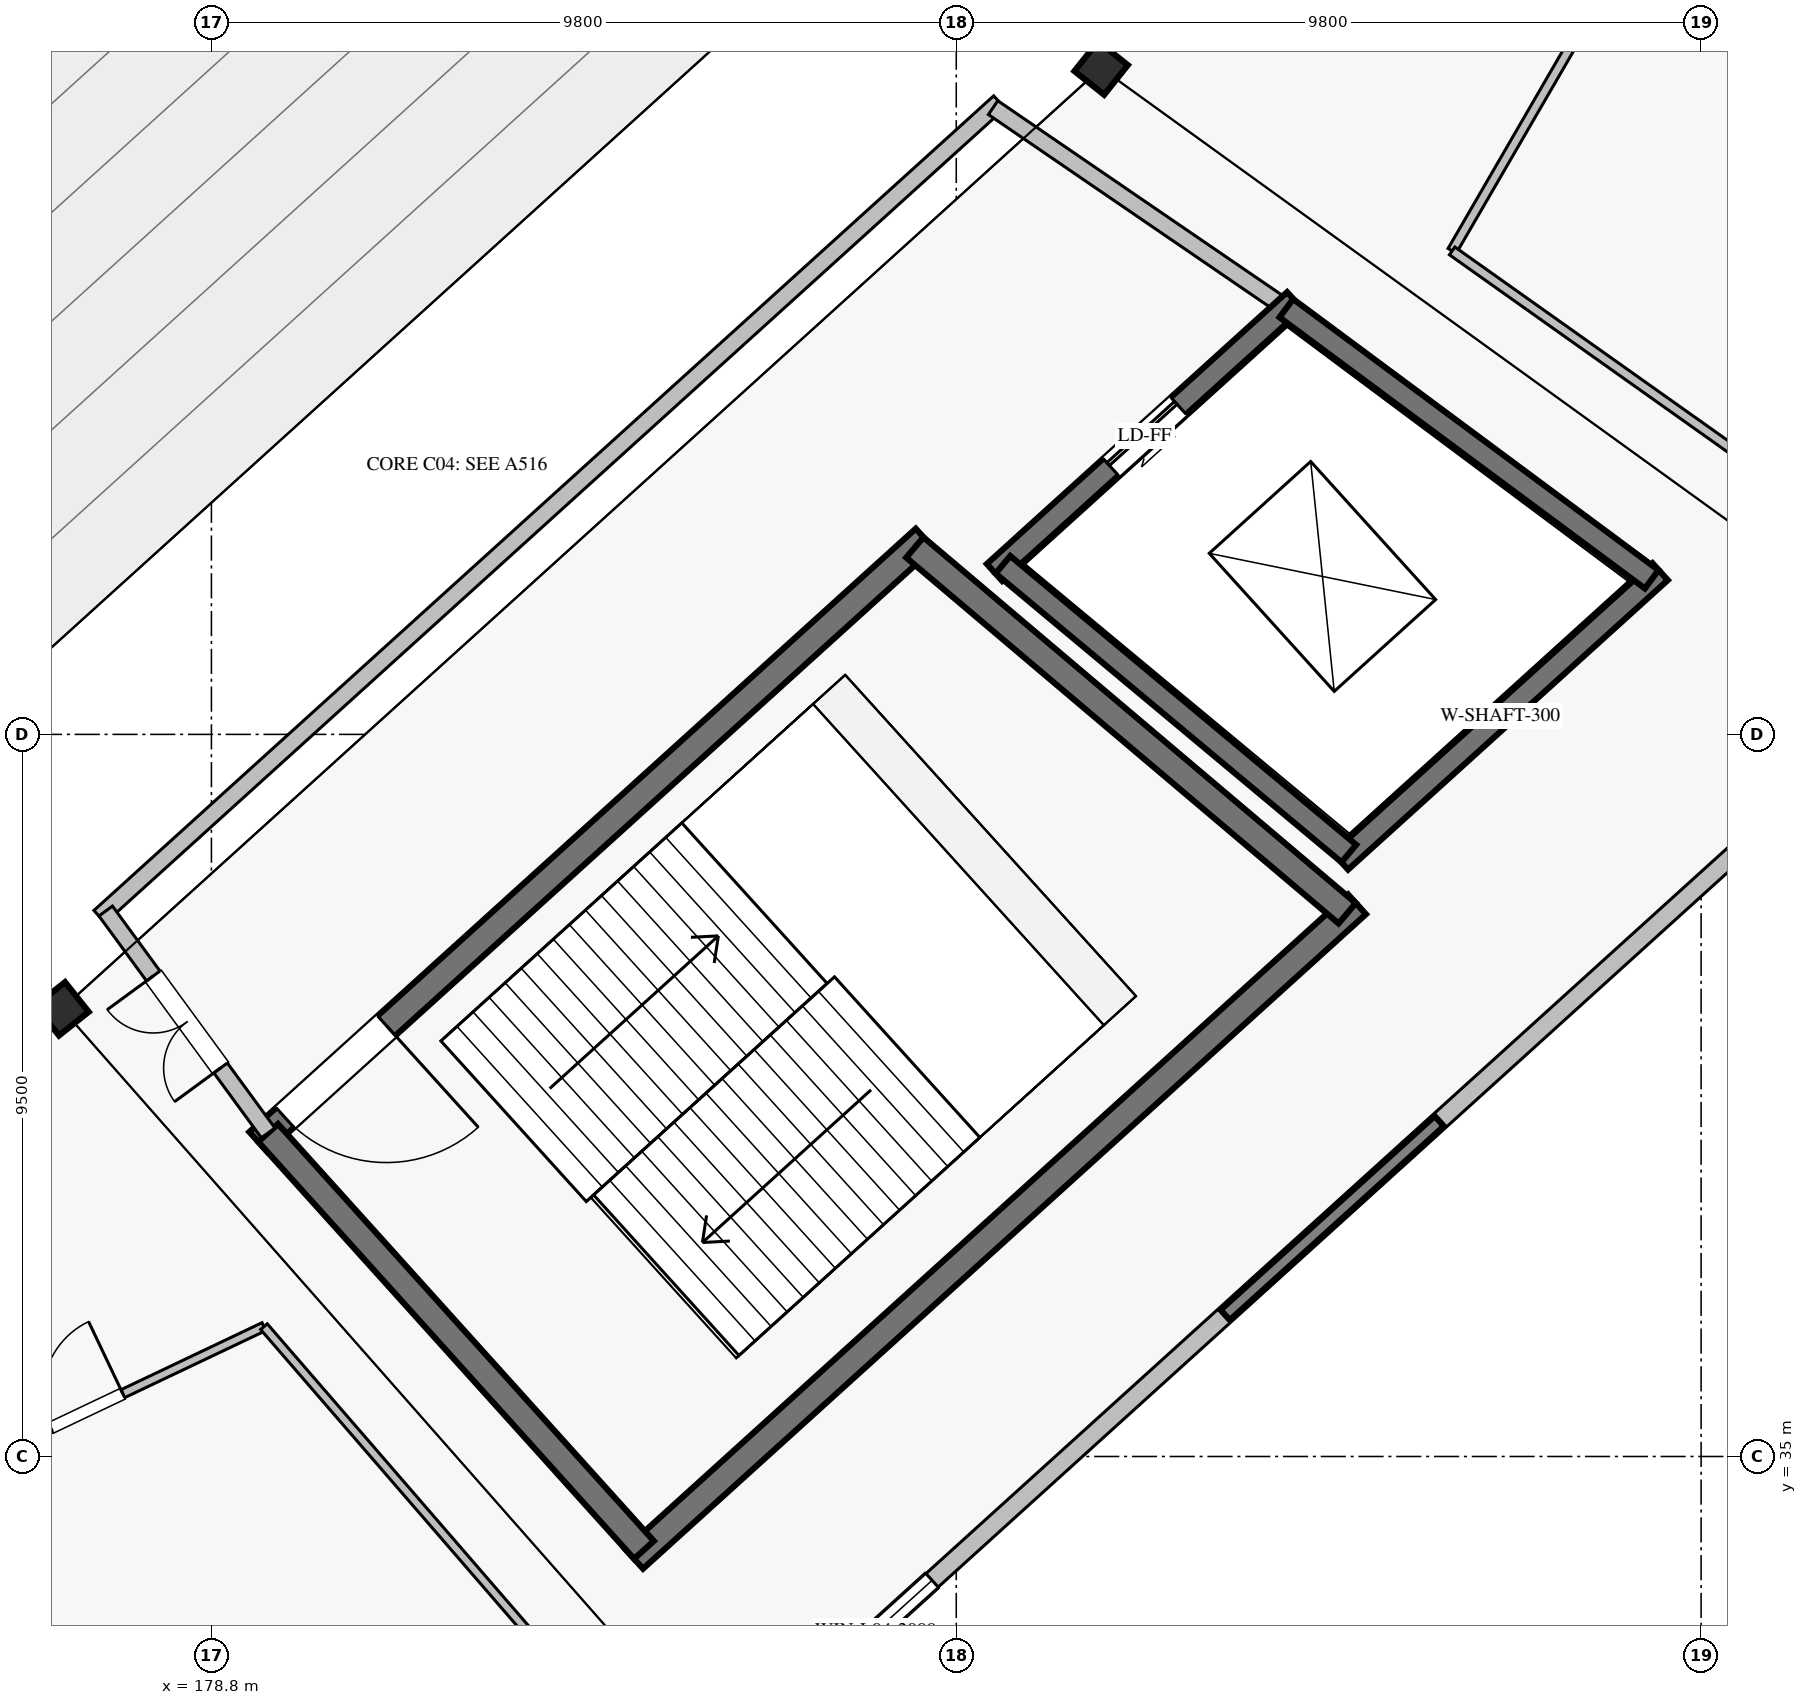
"""IFC4 building model, lengths in metres.
Left out: names, types, materials, properties, quantities, classifications, styles, units other than length and angle.
Written with IfcOpenShell. Run it as: python <this file> out.ifc"""

import sys

from ifc_helpers import new_model, si_unit, direction, frame, frame_2d, origin, origin_2d, place, context, subcontext, project, spatial, rectangle, hollow_rectangle, extrude, element, fill, save


model = new_model("IFC4")
c1 = context("Model", 3, precision=1e-05, world=origin(), true_north=direction((0.0, 1.0)))
c2 = subcontext(c1, "Body", "Model", "MODEL_VIEW")
j1 = project(units=[si_unit("LENGTHUNIT", "METRE"), si_unit("PLANEANGLEUNIT", "RADIAN")], contexts=[c1])
p1 = place(None, origin())
s1 = spatial("IfcSite", under=j1, at=p1, CompositionType="ELEMENT")
p2 = place(p1, origin())
s2 = spatial("IfcBuilding", under=s1, at=p2, CompositionType="ELEMENT")
p3 = place(p2, frame((0.0, 0.0, 20.4)))
s3 = spatial("IfcBuildingStorey", under=s2, at=p3, CompositionType="ELEMENT", Elevation=20.4)
for number, where, z_axis, x_axis in (
    (1, (176.834, 40.889, 0.0), (0.0, 0.0, 1.0), (0.623, -0.782, 0.0)),
    (2, (190.506, 53.266, 0.0), (0.0, 0.0, 1.0), (0.782, -0.623, 0.0)),
):
    element("IfcColumn", number, at=place(p3, frame(where, z_axis=z_axis, x_axis=x_axis)), inside=s3, PredefinedType="COLUMN", context=c2, shape_type="SweptSolid", body=[
        extrude(hollow_rectangle(XDim=0.5, YDim=0.5, WallThickness=0.022, at=origin_2d()), origin(), (0.0, 0.0, 1.0), 5.44),
    ])
p4 = place(p3, frame((185.761, 31.089, 0.0), z_axis=(0.0, 0.0, 1.0), x_axis=(0.741349049196, 0.671119651967, 0.0)))
e3 = element("IfcWall", 3, at=p4, inside=s3, PredefinedType="SOLIDWALL", context=c2, shape_type="SweptSolid", body=[
    extrude(rectangle(XDim=21.004, YDim=0.24, at=frame_2d((10.502, 0.0))), origin(), (0.0, 0.0, 1.0), 4.53),
])
p5 = place(p4, frame((1.4, 0.0, 1.0)))
e4 = element("IfcOpeningElement", 4, at=p5, cuts=e3, PredefinedType="OPENING", context=c2, shape_type="SweptSolid", body=[
    extrude(rectangle(XDim=2.0, YDim=1.55, at=frame_2d((1.0, 0.775))), frame((0.0, 0.13, 0.0), z_axis=(0.0, -1.0, 0.0), x_axis=(1.0, 0.0, 0.0)), (0.0, 0.0, 1.0), 0.26),
])
p6 = place(p3, frame((179.417, 39.14, 0.0), z_axis=(0.0, 0.0, 1.0), x_axis=(0.741348929385, 0.671119784315, 0.0)))
e5 = element("IfcWall", 5, at=p6, inside=s3, PredefinedType="SHEAR", context=c2, shape_type="SweptSolid", body=[
    extrude(rectangle(XDim=11.826, YDim=0.35, at=frame_2d((5.913, 0.0))), origin(), (0.0, 0.0, 1.0), 5.18),
])
p7 = place(p6, frame((0.475, 0.0, 0.0)))
e6 = element("IfcOpeningElement", 6, at=p7, cuts=e5, PredefinedType="OPENING", context=c2, shape_type="SweptSolid", body=[
    extrude(rectangle(XDim=1.8, YDim=2.2, at=frame_2d((0.9, 1.1))), frame((0.0, 0.185, 0.0), z_axis=(0.0, -1.0, 0.0), x_axis=(1.0, 0.0, 0.0)), (0.0, 0.0, 1.0), 0.37),
])
p8 = place(p3, frame((184.361, 33.653, 0.0), z_axis=(0.0, 0.0, 1.0), x_axis=(0.741351373721, 0.671117084183, 0.0)))
e7 = element("IfcWall", 7, at=p8, inside=s3, PredefinedType="SHEAR", context=c2, shape_type="SweptSolid", body=[
    extrude(rectangle(XDim=12.83, YDim=0.35, at=frame_2d((6.415, 0.0))), origin(), (0.0, 0.0, 1.0), 5.18),
])
p9 = place(p3, frame((179.546, 39.257, 0.0), z_axis=(0.0, 0.0, 1.0), x_axis=(0.669463145673, -0.742845270958, 0.0)))
e8 = element("IfcWall", 8, at=p9, inside=s3, PredefinedType="SHEAR", context=c2, shape_type="SweptSolid", body=[
    extrude(rectangle(XDim=7.386, YDim=0.35, at=frame_2d((3.693, 0.0))), origin(), (0.0, 0.0, 1.0), 5.18),
])
p10 = place(p3, frame((188.055, 46.959, 0.0), z_axis=(0.0, 0.0, 1.0), x_axis=(0.763422324031, -0.64589964791, 0.0)))
e9 = element("IfcWall", 9, at=p10, inside=s3, PredefinedType="SHEAR", context=c2, shape_type="SweptSolid", body=[
    extrude(rectangle(XDim=7.452, YDim=0.35, at=frame_2d((3.726, 0.0))), origin(), (0.0, 0.0, 1.0), 5.18),
])
p11 = place(p3, frame((189.103, 46.631, 0.0), z_axis=(0.0, 0.0, 1.0), x_axis=(0.741350155641, 0.671118429736, 0.0)))
e10 = element("IfcWall", 10, at=p11, inside=s3, PredefinedType="SHEAR", context=c2, shape_type="SweptSolid", body=[
    extrude(rectangle(XDim=5.329, YDim=0.3, at=frame_2d((2.665, 0.0))), origin(), (0.0, 0.0, 1.0), 5.18),
])
p12 = place(p11, frame((2.065, 0.0, 0.0)))
e11 = element("IfcOpeningElement", 11, at=p12, cuts=e10, PredefinedType="OPENING", context=c2, shape_type="SweptSolid", body=[
    extrude(rectangle(XDim=1.2, YDim=2.2, at=frame_2d((0.6, 1.1))), frame((0.0, 0.16, 0.0), z_axis=(0.0, -1.0, 0.0), x_axis=(1.0, 0.0, 0.0)), (0.0, 0.0, 1.0), 0.32),
])
p13 = place(p3, frame((193.654, 42.832, 0.0), z_axis=(0.0, 0.0, 1.0), x_axis=(0.74134208775, 0.671127341815, 0.0)))
e12 = element("IfcWall", 12, at=p13, inside=s3, PredefinedType="SHEAR", context=c2, shape_type="SweptSolid", body=[
    extrude(rectangle(XDim=5.675, YDim=0.3, at=frame_2d((2.837, 0.0))), origin(), (0.0, 0.0, 1.0), 5.18),
])
p14 = place(p3, frame((189.214, 46.732, 0.0), z_axis=(0.0, 0.0, 1.0), x_axis=(0.767711354146, -0.640795815151, 0.0)))
e13 = element("IfcWall", 13, at=p14, inside=s3, PredefinedType="SHEAR", context=c2, shape_type="SweptSolid", body=[
    extrude(rectangle(XDim=5.929, YDim=0.3, at=frame_2d((2.964, 0.0))), origin(), (0.0, 0.0, 1.0), 5.18),
])
p15 = place(p3, frame((192.942, 50.107, 0.0), z_axis=(0.0, 0.0, 1.0), x_axis=(0.803101805449, -0.59584183311, 0.0)))
e14 = element("IfcWall", 14, at=p15, inside=s3, PredefinedType="SHEAR", context=c2, shape_type="SweptSolid", body=[
    extrude(rectangle(XDim=5.986, YDim=0.3, at=frame_2d((2.993, 0.0))), origin(), (0.0, 0.0, 1.0), 5.18),
])
p16 = place(p3, frame((177.327, 42.102, 0.0), z_axis=(0.0, 0.0, 1.0), x_axis=(0.741351035574, 0.671117457717, 0.0)))
e15 = element("IfcWall", 15, at=p16, inside=s3, PredefinedType="SOLIDWALL", context=c2, shape_type="SweptSolid", body=[
    extrude(rectangle(XDim=15.969, YDim=0.22, at=frame_2d((7.985, 0.0))), origin(), (0.0, 0.0, 1.0), 5.18),
])
p17 = place(p3, frame((177.409, 42.176, 0.0), z_axis=(0.0, 0.0, 1.0), x_axis=(0.590836915359, -0.806791013491, 0.0)))
e16 = element("IfcWall", 16, at=p17, inside=s3, PredefinedType="SOLIDWALL", context=c2, shape_type="SweptSolid", body=[
    extrude(rectangle(XDim=3.618, YDim=0.22, at=frame_2d((1.809, 0.0))), origin(), (0.0, 0.0, 1.0), 5.18),
])
p18 = place(p17, frame((1.059, 0.0, 0.0)))
e17 = element("IfcOpeningElement", 17, at=p18, cuts=e16, PredefinedType="OPENING", context=c2, shape_type="SweptSolid", body=[
    extrude(rectangle(XDim=1.5, YDim=2.2, at=frame_2d((0.75, 1.1))), frame((0.0, 0.12, 0.0), z_axis=(0.0, -1.0, 0.0), x_axis=(1.0, 0.0, 0.0)), (0.0, 0.0, 1.0), 0.24),
])
p19 = place(p3, frame((189.085, 52.746, 0.0), z_axis=(0.0, 0.0, 1.0), x_axis=(0.825385410642, -0.564569680287, 0.0)))
e18 = element("IfcWall", 18, at=p19, inside=s3, PredefinedType="SOLIDWALL", context=c2, shape_type="SweptSolid", body=[
    extrude(rectangle(XDim=4.674, YDim=0.22, at=frame_2d((2.337, 0.0))), origin(), (0.0, 0.0, 1.0), 5.18),
])
p20 = place(p3, frame((162.847, 28.8, 0.0), z_axis=(0.0, 0.0, 1.0), x_axis=(0.90321677741, 0.429184637429, 0.0)))
e19 = element("IfcWall", 19, at=p20, inside=s3, PredefinedType="PARTITIONING", context=c2, shape_type="SweptSolid", body=[
    extrude(rectangle(XDim=18.427, YDim=0.115, at=frame_2d((9.214, 0.0))), origin(), (0.0, 0.0, 1.0), 4.5),
])
p21 = place(p20, frame((2.867, 0.0, 0.0)))
e20 = element("IfcOpeningElement", 20, at=p21, cuts=e19, PredefinedType="OPENING", context=c2, shape_type="SweptSolid", body=[
    extrude(rectangle(XDim=0.9, YDim=2.1, at=frame_2d((0.45, 1.05))), frame((0.0, 0.067, 0.0), z_axis=(0.0, -1.0, 0.0), x_axis=(1.0, 0.0, 0.0)), (0.0, 0.0, 1.0), 0.135),
])
p22 = place(p20, frame((9.501, 0.0, 0.0)))
e21 = element("IfcOpeningElement", 21, at=p22, cuts=e19, PredefinedType="OPENING", context=c2, shape_type="SweptSolid", body=[
    extrude(rectangle(XDim=0.9, YDim=2.1, at=frame_2d((0.45, 1.05))), frame((0.0, 0.067, 0.0), z_axis=(0.0, -1.0, 0.0), x_axis=(1.0, 0.0, 0.0)), (0.0, 0.0, 1.0), 0.135),
])
p23 = place(p20, frame((15.322, 0.0, 0.0)))
e22 = element("IfcOpeningElement", 22, at=p23, cuts=e19, PredefinedType="OPENING", context=c2, shape_type="SweptSolid", body=[
    extrude(rectangle(XDim=1.05, YDim=2.1, at=frame_2d((0.525, 1.05))), frame((0.0, 0.067, 0.0), z_axis=(0.0, -1.0, 0.0), x_axis=(1.0, 0.0, 0.0)), (0.0, 0.0, 1.0), 0.135),
])
p24 = place(p3, frame((179.491, 36.708, 0.0), z_axis=(0.0, 0.0, 1.0), x_axis=(0.654288201841, -0.7562452968, 0.0)))
e23 = element("IfcWall", 23, at=p24, inside=s3, PredefinedType="PARTITIONING", context=c2, shape_type="SweptSolid", body=[
    extrude(rectangle(XDim=7.368, YDim=0.115, at=frame_2d((3.684, 0.0))), origin(), (0.0, 0.0, 1.0), 4.5),
])
p25 = place(p3, frame((174.881, 34.518, 0.0), z_axis=(0.0, 0.0, 1.0), x_axis=(0.609491469693, -0.792792626335, 0.0)))
e24 = element("IfcWall", 24, at=p25, inside=s3, PredefinedType="PARTITIONING", context=c2, shape_type="SweptSolid", body=[
    extrude(rectangle(XDim=7.264, YDim=0.1, at=frame_2d((3.632, 0.0))), origin(), (0.0, 0.0, 1.0), 4.5),
])
p26 = place(p3, frame((195.125, 50.861, 0.0), z_axis=(0.0, 0.0, 1.0), x_axis=(0.501622425841, 0.865086667273, 0.0)))
e25 = element("IfcWall", 25, at=p26, inside=s3, PredefinedType="PARTITIONING", context=c2, shape_type="SweptSolid", body=[
    extrude(rectangle(XDim=17.417, YDim=0.125, at=frame_2d((8.708, 0.0))), origin(), (0.0, 0.0, 1.0), 4.5),
])
p27 = place(p26, frame((8.098, 0.0, 0.0)))
e26 = element("IfcOpeningElement", 26, at=p27, cuts=e25, PredefinedType="OPENING", context=c2, shape_type="SweptSolid", body=[
    extrude(rectangle(XDim=1.22, YDim=2.15, at=frame_2d((0.61, 1.075))), frame((0.0, 0.073, 0.0), z_axis=(0.0, -1.0, 0.0), x_axis=(1.0, 0.0, 0.0)), (0.0, 0.0, 1.0), 0.145),
])
p28 = place(p3, frame((195.125, 50.861, 0.0), z_axis=(0.0, 0.0, 1.0), x_axis=(0.815757317426, -0.578394328348, 0.0)))
e27 = element("IfcWall", 27, at=p28, inside=s3, PredefinedType="PARTITIONING", context=c2, shape_type="SweptSolid", body=[
    extrude(rectangle(XDim=7.545, YDim=0.125, at=frame_2d((3.773, 0.0))), origin(), (0.0, 0.0, 1.0), 4.5),
])
p29 = place(p5, origin())
e28 = element("IfcWindow", 28, at=p29, inside=s3, PartitioningType="SINGLE_PANEL", PredefinedType="WINDOW", context=c2, shape_type="SweptSolid", body=[
    extrude(rectangle(XDim=2.0, YDim=1.55, at=frame_2d((1.0, 0.775))), frame((0.0, 0.03, 0.0), z_axis=(0.0, -1.0, 0.0), x_axis=(1.0, 0.0, 0.0)), (0.0, 0.0, 1.0), 0.06),
])
fill(e4, e28)
p30 = place(p7, frame((1.8, 0.0, 0.0), z_axis=(0.0, 0.0, 1.0), x_axis=(-1.0, 0.0, 0.0)))
e29 = element("IfcDoor", 29, at=p30, inside=s3, OperationType="SINGLE_SWING_LEFT", PredefinedType="DOOR", context=c2, shape_type="SweptSolid", body=[
    extrude(rectangle(XDim=1.8, YDim=2.2, at=frame_2d((0.9, 1.1))), frame((0.0, 0.025, 0.0), z_axis=(0.0, -1.0, 0.0), x_axis=(1.0, 0.0, 0.0)), (0.0, 0.0, 1.0), 0.05),
])
fill(e6, e29)
p31 = place(p12, origin())
e30 = element("IfcDoor", 30, at=p31, inside=s3, OperationType="SLIDING_TO_LEFT", PredefinedType="DOOR", context=c2, shape_type="SweptSolid", body=[
    extrude(rectangle(XDim=1.2, YDim=2.2, at=frame_2d((0.6, 1.1))), frame((0.0, 0.025, 0.0), z_axis=(0.0, -1.0, 0.0), x_axis=(1.0, 0.0, 0.0)), (0.0, 0.0, 1.0), 0.05),
])
fill(e11, e30)
p32 = place(p18, frame((1.5, 0.0, 0.0), z_axis=(0.0, 0.0, 1.0), x_axis=(-1.0, 0.0, 0.0)))
e31 = element("IfcDoor", 31, at=p32, inside=s3, OperationType="DOUBLE_DOOR_SINGLE_SWING", PredefinedType="DOOR", context=c2, shape_type="SweptSolid", body=[
    extrude(rectangle(XDim=1.5, YDim=2.2, at=frame_2d((0.75, 1.1))), frame((0.0, 0.025, 0.0), z_axis=(0.0, -1.0, 0.0), x_axis=(1.0, 0.0, 0.0)), (0.0, 0.0, 1.0), 0.05),
])
fill(e17, e31)
p33 = place(p23, origin())
e32 = element("IfcDoor", 32, at=p33, inside=s3, OperationType="SINGLE_SWING_RIGHT", PredefinedType="DOOR", context=c2, shape_type="SweptSolid", body=[
    extrude(rectangle(XDim=1.05, YDim=2.1, at=frame_2d((0.525, 1.05))), frame((0.0, 0.025, 0.0), z_axis=(0.0, -1.0, 0.0), x_axis=(1.0, 0.0, 0.0)), (0.0, 0.0, 1.0), 0.05),
])
fill(e22, e32)
save(model, sys.argv[1])
